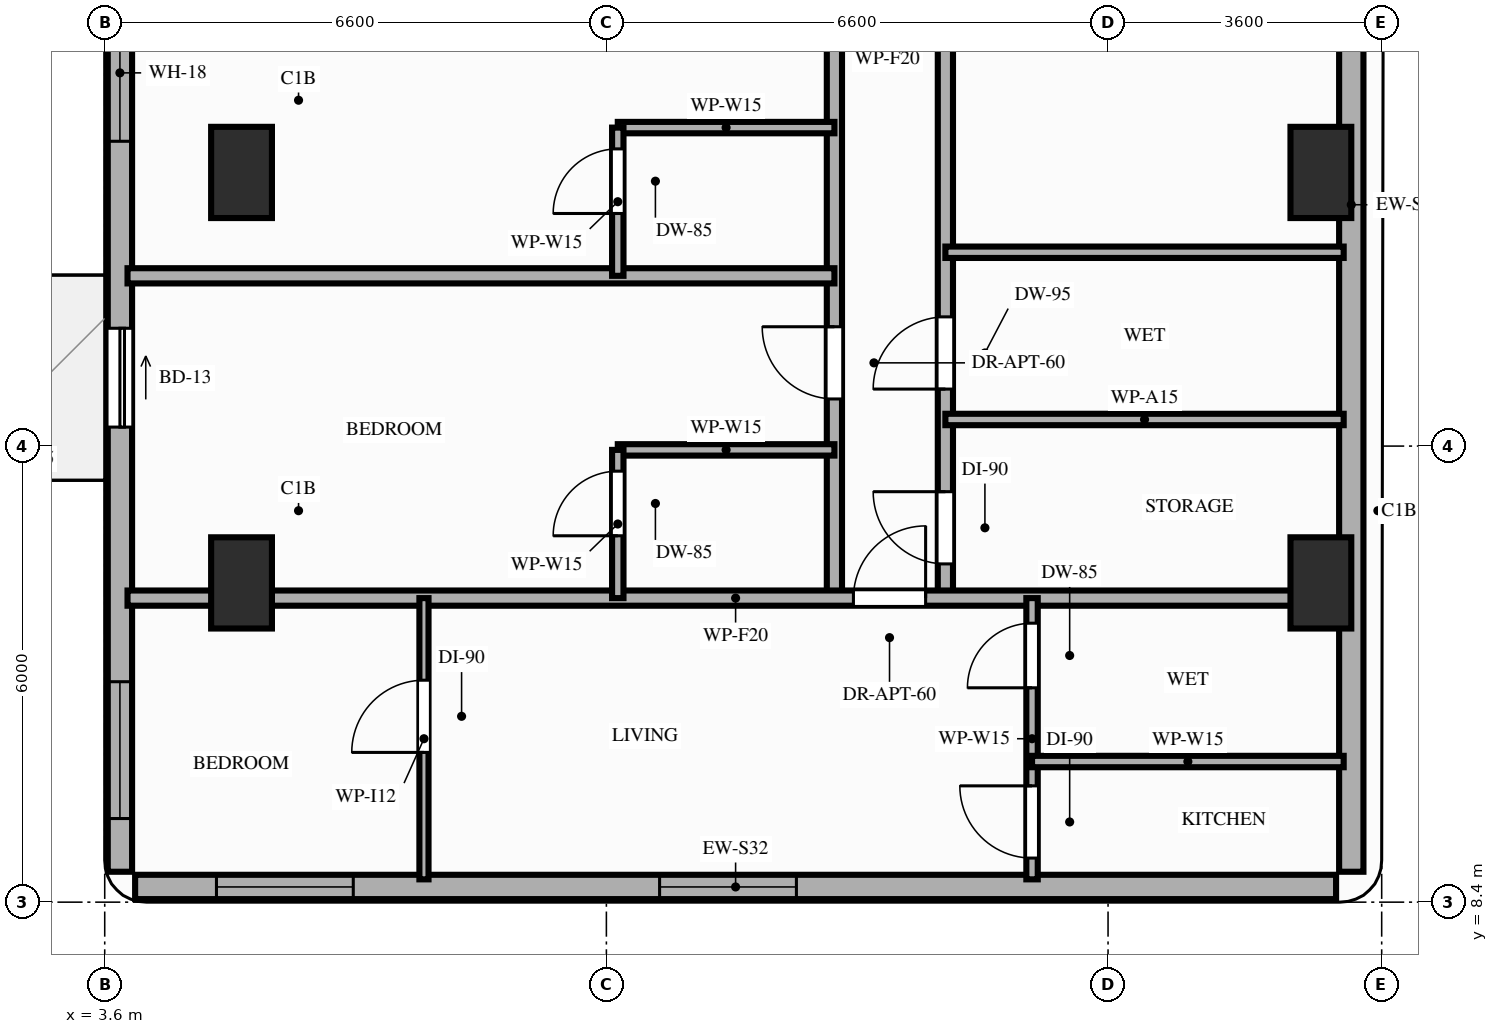
"""IFC4 building model, lengths in metres.
Left out: names, types, materials, properties, quantities, classifications, styles, units other than length and angle.
Written with IfcOpenShell. Run it as: python <this file> out.ifc"""

import sys

from ifc_helpers import new_model, si_unit, direction, frame, frame_2d, origin, origin_2d, place, context, subcontext, project, spatial, rectangle, extrude, element, fill, save


model = new_model("IFC4")
c1 = context("Model", 3, precision=1e-05, world=origin(), true_north=direction((0.0, 1.0)))
c2 = subcontext(c1, "Body", "Model", "MODEL_VIEW")
j1 = project(units=[si_unit("LENGTHUNIT", "METRE"), si_unit("PLANEANGLEUNIT", "RADIAN")], contexts=[c1])
p1 = place(None, origin())
s1 = spatial("IfcSite", under=j1, at=p1, CompositionType="ELEMENT")
p2 = place(p1, origin())
s2 = spatial("IfcBuilding", under=s1, at=p2, CompositionType="ELEMENT")
p3 = place(p2, frame((0.0, 0.0, 96.2)))
s3 = spatial("IfcBuildingStorey", under=s2, at=p3, CompositionType="ELEMENT", Elevation=96.2)
for number, where, z_axis, x_axis in (
    (1, (5.4, 12.6, 0.0), (0.0, 0.0, 1.0), (1.0, 0.0, 0.0)),
    (2, (19.6, 12.6, 0.0), (0.0, 0.0, 1.0), (1.0, 0.0, 0.0)),
    (3, (5.4, 18.0, 0.0), (0.0, 0.0, 1.0), (1.0, 0.0, 0.0)),
    (4, (19.6, 18.0, 0.0), (0.0, 0.0, 1.0), (1.0, 0.0, 0.0)),
):
    element("IfcColumn", number, at=place(p3, frame(where, z_axis=z_axis, x_axis=x_axis)), inside=s3, PredefinedType="COLUMN", context=c2, shape_type="SweptSolid", body=[
        extrude(rectangle(XDim=0.8, YDim=1.2, at=origin_2d()), origin(), (0.0, 0.0, 1.0), 3.2),
    ])
p4 = place(p3, frame((4.0, 8.6, 0.0), z_axis=(0.0, 0.0, 1.0), x_axis=(1.0, 0.0, 0.0)))
e5 = element("IfcWall", 5, at=p4, inside=s3, PredefinedType="STANDARD", context=c2, shape_type="SweptSolid", body=[
    extrude(rectangle(XDim=15.8, YDim=0.32, at=frame_2d((7.9, 0.0))), origin(), (0.0, 0.0, 1.0), 3.02),
])
p5 = place(p4, frame((1.07, 0.0, 0.85)))
e6 = element("IfcOpeningElement", 6, at=p5, cuts=e5, PredefinedType="OPENING", context=c2, shape_type="SweptSolid", body=[
    extrude(rectangle(XDim=1.8, YDim=1.75, at=frame_2d((0.9, 0.875))), frame((0.0, 0.17, 0.0), z_axis=(0.0, -1.0, 0.0), x_axis=(1.0, 0.0, 0.0)), (0.0, 0.0, 1.0), 0.34),
])
p6 = place(p4, frame((6.9, 0.0, 0.85)))
e7 = element("IfcOpeningElement", 7, at=p6, cuts=e5, PredefinedType="OPENING", context=c2, shape_type="SweptSolid", body=[
    extrude(rectangle(XDim=1.8, YDim=1.75, at=frame_2d((0.9, 0.875))), frame((0.0, 0.17, 0.0), z_axis=(0.0, -1.0, 0.0), x_axis=(1.0, 0.0, 0.0)), (0.0, 0.0, 1.0), 0.34),
])
p7 = place(p3, frame((3.8, 42.1, 0.0), z_axis=(0.0, 0.0, 1.0), x_axis=(0.0, -1.0, 0.0)))
e8 = element("IfcWall", 8, at=p7, inside=s3, PredefinedType="STANDARD", context=c2, shape_type="SweptSolid", body=[
    extrude(rectangle(XDim=33.3, YDim=0.32, at=frame_2d((16.65, 0.0))), origin(), (0.0, 0.0, 1.0), 2.71),
])
p8 = place(p7, frame((26.15, 0.0, 0.0)))
e9 = element("IfcOpeningElement", 9, at=p8, cuts=e8, PredefinedType="OPENING", context=c2, shape_type="SweptSolid", body=[
    extrude(rectangle(XDim=1.3, YDim=2.08, at=frame_2d((0.65, 1.04))), frame((0.0, 0.17, 0.0), z_axis=(0.0, -1.0, 0.0), x_axis=(1.0, 0.0, 0.0)), (0.0, 0.0, 1.0), 0.34),
])
p9 = place(p7, frame((15.35, 0.0, 0.0)))
e10 = element("IfcOpeningElement", 10, at=p9, cuts=e8, PredefinedType="OPENING", context=c2, shape_type="SweptSolid", body=[
    extrude(rectangle(XDim=1.3, YDim=2.08, at=frame_2d((0.65, 1.04))), frame((0.0, 0.17, 0.0), z_axis=(0.0, -1.0, 0.0), x_axis=(1.0, 0.0, 0.0)), (0.0, 0.0, 1.0), 0.34),
])
p10 = place(p7, frame((21.89, 0.0, 0.85)))
e11 = element("IfcOpeningElement", 11, at=p10, cuts=e8, PredefinedType="OPENING", context=c2, shape_type="SweptSolid", body=[
    extrude(rectangle(XDim=1.8, YDim=1.61, at=frame_2d((0.9, 0.805))), frame((0.0, 0.17, 0.0), z_axis=(0.0, -1.0, 0.0), x_axis=(1.0, 0.0, 0.0)), (0.0, 0.0, 1.0), 0.34),
])
p11 = place(p7, frame((30.8, 0.0, 0.85)))
e12 = element("IfcOpeningElement", 12, at=p11, cuts=e8, PredefinedType="OPENING", context=c2, shape_type="SweptSolid", body=[
    extrude(rectangle(XDim=1.8, YDim=1.61, at=frame_2d((0.9, 0.805))), frame((0.0, 0.17, 0.0), z_axis=(0.0, -1.0, 0.0), x_axis=(1.0, 0.0, 0.0)), (0.0, 0.0, 1.0), 0.34),
])
p12 = place(p7, frame((9.9, 0.0, 0.85)))
e13 = element("IfcOpeningElement", 13, at=p12, cuts=e8, PredefinedType="OPENING", context=c2, shape_type="SweptSolid", body=[
    extrude(rectangle(XDim=1.8, YDim=1.61, at=frame_2d((0.9, 0.805))), frame((0.0, 0.17, 0.0), z_axis=(0.0, -1.0, 0.0), x_axis=(1.0, 0.0, 0.0)), (0.0, 0.0, 1.0), 0.34),
])
p13 = place(p7, frame((3.8, 0.0, 0.85)))
e14 = element("IfcOpeningElement", 14, at=p13, cuts=e8, PredefinedType="OPENING", context=c2, shape_type="SweptSolid", body=[
    extrude(rectangle(XDim=1.8, YDim=1.61, at=frame_2d((0.9, 0.805))), frame((0.0, 0.17, 0.0), z_axis=(0.0, -1.0, 0.0), x_axis=(1.0, 0.0, 0.0)), (0.0, 0.0, 1.0), 0.34),
])
p14 = place(p3, frame((20.0, 8.8, 0.0), z_axis=(0.0, 0.0, 1.0), x_axis=(0.0, 1.0, 0.0)))
e15 = element("IfcWall", 15, at=p14, inside=s3, PredefinedType="STANDARD", context=c2, shape_type="SweptSolid", body=[
    extrude(rectangle(XDim=17.55, YDim=0.32, at=frame_2d((8.775, 0.0))), origin(), (0.0, 0.0, 1.0), 2.41),
])
p15 = place(p14, frame((11.0, 0.0, 0.85)))
e16 = element("IfcOpeningElement", 16, at=p15, cuts=e15, PredefinedType="OPENING", context=c2, shape_type="SweptSolid", body=[
    extrude(rectangle(XDim=1.8, YDim=1.31, at=frame_2d((0.9, 0.655))), frame((0.0, 0.17, 0.0), z_axis=(0.0, -1.0, 0.0), x_axis=(1.0, 0.0, 0.0)), (0.0, 0.0, 1.0), 0.34),
])
p16 = place(p3, frame((13.2, 12.4, 0.0), z_axis=(0.0, 0.0, 1.0), x_axis=(0.0, 1.0, 0.0)))
e17 = element("IfcWall", 17, at=p16, inside=s3, PredefinedType="PARTITIONING", context=c2, shape_type="SweptSolid", body=[
    extrude(rectangle(XDim=15.7, YDim=0.2, at=frame_2d((7.85, 0.0))), origin(), (0.0, 0.0, 1.0), 2.41),
])
p17 = place(p16, frame((2.62, 0.0, 0.0)))
e18 = element("IfcOpeningElement", 18, at=p17, cuts=e17, PredefinedType="OPENING", context=c2, shape_type="SweptSolid", body=[
    extrude(rectangle(XDim=0.95, YDim=2.15, at=frame_2d((0.475, 1.075))), frame((0.0, 0.11, 0.0), z_axis=(0.0, -1.0, 0.0), x_axis=(1.0, 0.0, 0.0)), (0.0, 0.0, 1.0), 0.22),
])
p18 = place(p16, frame((7.4, 0.0, 0.0)))
e19 = element("IfcOpeningElement", 19, at=p18, cuts=e17, PredefinedType="OPENING", context=c2, shape_type="SweptSolid", body=[
    extrude(rectangle(XDim=0.95, YDim=2.15, at=frame_2d((0.475, 1.075))), frame((0.0, 0.11, 0.0), z_axis=(0.0, -1.0, 0.0), x_axis=(1.0, 0.0, 0.0)), (0.0, 0.0, 1.0), 0.22),
])
p19 = place(p16, frame((12.16, 0.0, 0.0)))
e20 = element("IfcOpeningElement", 20, at=p19, cuts=e17, PredefinedType="OPENING", context=c2, shape_type="SweptSolid", body=[
    extrude(rectangle(XDim=0.95, YDim=2.15, at=frame_2d((0.475, 1.075))), frame((0.0, 0.11, 0.0), z_axis=(0.0, -1.0, 0.0), x_axis=(1.0, 0.0, 0.0)), (0.0, 0.0, 1.0), 0.22),
])
p20 = place(p3, frame((14.66, 12.4, 0.0), z_axis=(0.0, 0.0, 1.0), x_axis=(0.0, 1.0, 0.0)))
e21 = element("IfcWall", 21, at=p20, inside=s3, PredefinedType="PARTITIONING", context=c2, shape_type="SweptSolid", body=[
    extrude(rectangle(XDim=15.7, YDim=0.2, at=frame_2d((7.85, 0.0))), origin(), (0.0, 0.0, 1.0), 2.41),
])
p21 = place(p20, frame((0.45, 0.0, 0.0)))
e22 = element("IfcOpeningElement", 22, at=p21, cuts=e21, PredefinedType="OPENING", context=c2, shape_type="SweptSolid", body=[
    extrude(rectangle(XDim=0.95, YDim=2.15, at=frame_2d((0.475, 1.075))), frame((0.0, 0.11, 0.0), z_axis=(0.0, -1.0, 0.0), x_axis=(1.0, 0.0, 0.0)), (0.0, 0.0, 1.0), 0.22),
])
p22 = place(p20, frame((2.75, 0.0, 0.0)))
e23 = element("IfcOpeningElement", 23, at=p22, cuts=e21, PredefinedType="OPENING", context=c2, shape_type="SweptSolid", body=[
    extrude(rectangle(XDim=0.95, YDim=2.1, at=frame_2d((0.475, 1.05))), frame((0.0, 0.11, 0.0), z_axis=(0.0, -1.0, 0.0), x_axis=(1.0, 0.0, 0.0)), (0.0, 0.0, 1.0), 0.22),
])
p23 = place(p20, frame((9.62, 0.0, 0.0)))
e24 = element("IfcOpeningElement", 24, at=p23, cuts=e21, PredefinedType="OPENING", context=c2, shape_type="SweptSolid", body=[
    extrude(rectangle(XDim=1.0, YDim=2.15, at=frame_2d((0.5, 1.075))), frame((0.0, 0.11, 0.0), z_axis=(0.0, -1.0, 0.0), x_axis=(1.0, 0.0, 0.0)), (0.0, 0.0, 1.0), 0.22),
])
p24 = place(p3, frame((3.9, 12.4, 0.0), z_axis=(0.0, 0.0, 1.0), x_axis=(1.0, 0.0, 0.0)))
e25 = element("IfcWall", 25, at=p24, inside=s3, PredefinedType="PARTITIONING", context=c2, shape_type="SweptSolid", body=[
    extrude(rectangle(XDim=16.0, YDim=0.2, at=frame_2d((8.0, 0.0))), origin(), (0.0, 0.0, 1.0), 2.41),
])
p25 = place(p24, frame((9.55, 0.0, 0.0)))
e26 = element("IfcOpeningElement", 26, at=p25, cuts=e25, PredefinedType="OPENING", context=c2, shape_type="SweptSolid", body=[
    extrude(rectangle(XDim=0.95, YDim=2.15, at=frame_2d((0.475, 1.075))), frame((0.0, 0.11, 0.0), z_axis=(0.0, -1.0, 0.0), x_axis=(1.0, 0.0, 0.0)), (0.0, 0.0, 1.0), 0.22),
])
p26 = place(p3, frame((10.35, 14.35, 0.0), z_axis=(0.0, 0.0, 1.0), x_axis=(1.0, 0.0, 0.0)))
e27 = element("IfcWall", 27, at=p26, inside=s3, PredefinedType="PARTITIONING", context=c2, shape_type="SweptSolid", body=[
    extrude(rectangle(XDim=2.85, YDim=0.15, at=frame_2d((1.425, 0.0))), origin(), (0.0, 0.0, 1.0), 2.71),
])
p27 = place(p3, frame((10.35, 12.4, 0.0), z_axis=(0.0, 0.0, 1.0), x_axis=(0.0, 1.0, 0.0)))
e28 = element("IfcWall", 28, at=p27, inside=s3, PredefinedType="PARTITIONING", context=c2, shape_type="SweptSolid", body=[
    extrude(rectangle(XDim=1.95, YDim=0.15, at=frame_2d((0.975, 0.0))), origin(), (0.0, 0.0, 1.0), 2.41),
])
p28 = place(p27, frame((0.82, 0.0, 0.0)))
e29 = element("IfcOpeningElement", 29, at=p28, cuts=e28, PredefinedType="OPENING", context=c2, shape_type="SweptSolid", body=[
    extrude(rectangle(XDim=0.85, YDim=2.1, at=frame_2d((0.425, 1.05))), frame((0.0, 0.085, 0.0), z_axis=(0.0, -1.0, 0.0), x_axis=(1.0, 0.0, 0.0)), (0.0, 0.0, 1.0), 0.17),
])
p29 = place(p3, frame((3.9, 16.64, 0.0), z_axis=(0.0, 0.0, 1.0), x_axis=(1.0, 0.0, 0.0)))
e30 = element("IfcWall", 30, at=p29, inside=s3, PredefinedType="PARTITIONING", context=c2, shape_type="SweptSolid", body=[
    extrude(rectangle(XDim=9.3, YDim=0.2, at=frame_2d((4.65, 0.0))), origin(), (0.0, 0.0, 1.0), 2.41),
])
p30 = place(p3, frame((10.35, 18.59, 0.0), z_axis=(0.0, 0.0, 1.0), x_axis=(1.0, 0.0, 0.0)))
e31 = element("IfcWall", 31, at=p30, inside=s3, PredefinedType="PARTITIONING", context=c2, shape_type="SweptSolid", body=[
    extrude(rectangle(XDim=2.85, YDim=0.15, at=frame_2d((1.425, 0.0))), origin(), (0.0, 0.0, 1.0), 3.02),
])
p31 = place(p3, frame((10.35, 16.64, 0.0), z_axis=(0.0, 0.0, 1.0), x_axis=(0.0, 1.0, 0.0)))
e32 = element("IfcWall", 32, at=p31, inside=s3, PredefinedType="PARTITIONING", context=c2, shape_type="SweptSolid", body=[
    extrude(rectangle(XDim=1.95, YDim=0.15, at=frame_2d((0.975, 0.0))), origin(), (0.0, 0.0, 1.0), 2.41),
])
p32 = place(p31, frame((0.82, 0.0, 0.0)))
e33 = element("IfcOpeningElement", 33, at=p32, cuts=e32, PredefinedType="OPENING", context=c2, shape_type="SweptSolid", body=[
    extrude(rectangle(XDim=0.85, YDim=2.1, at=frame_2d((0.425, 1.05))), frame((0.0, 0.085, 0.0), z_axis=(0.0, -1.0, 0.0), x_axis=(1.0, 0.0, 0.0)), (0.0, 0.0, 1.0), 0.17),
])
p33 = place(p3, frame((7.8, 8.7, 0.0), z_axis=(0.0, 0.0, 1.0), x_axis=(0.0, 1.0, 0.0)))
e34 = element("IfcWall", 34, at=p33, inside=s3, PredefinedType="PARTITIONING", context=c2, shape_type="SweptSolid", body=[
    extrude(rectangle(XDim=3.7, YDim=0.12, at=frame_2d((1.85, 0.0))), origin(), (0.0, 0.0, 1.0), 2.41),
])
p34 = place(p33, frame((1.67, 0.0, 0.0)))
e35 = element("IfcOpeningElement", 35, at=p34, cuts=e34, PredefinedType="OPENING", context=c2, shape_type="SweptSolid", body=[
    extrude(rectangle(XDim=0.95, YDim=2.15, at=frame_2d((0.475, 1.075))), frame((0.0, 0.07, 0.0), z_axis=(0.0, -1.0, 0.0), x_axis=(1.0, 0.0, 0.0)), (0.0, 0.0, 1.0), 0.14),
])
p35 = place(p3, frame((15.8, 8.7, 0.0), z_axis=(0.0, 0.0, 1.0), x_axis=(0.0, 1.0, 0.0)))
e36 = element("IfcWall", 36, at=p35, inside=s3, PredefinedType="PARTITIONING", context=c2, shape_type="SweptSolid", body=[
    extrude(rectangle(XDim=3.7, YDim=0.15, at=frame_2d((1.85, 0.0))), origin(), (0.0, 0.0, 1.0), 2.41),
])
p36 = place(p35, frame((0.28, 0.0, 0.0)))
e37 = element("IfcOpeningElement", 37, at=p36, cuts=e36, PredefinedType="OPENING", context=c2, shape_type="SweptSolid", body=[
    extrude(rectangle(XDim=0.95, YDim=2.15, at=frame_2d((0.475, 1.075))), frame((0.0, 0.085, 0.0), z_axis=(0.0, -1.0, 0.0), x_axis=(1.0, 0.0, 0.0)), (0.0, 0.0, 1.0), 0.17),
])
p37 = place(p35, frame((2.52, 0.0, 0.0)))
e38 = element("IfcOpeningElement", 38, at=p37, cuts=e36, PredefinedType="OPENING", context=c2, shape_type="SweptSolid", body=[
    extrude(rectangle(XDim=0.85, YDim=2.1, at=frame_2d((0.425, 1.05))), frame((0.0, 0.085, 0.0), z_axis=(0.0, -1.0, 0.0), x_axis=(1.0, 0.0, 0.0)), (0.0, 0.0, 1.0), 0.17),
])
p38 = place(p3, frame((15.8, 10.25, 0.0), z_axis=(0.0, 0.0, 1.0), x_axis=(1.0, 0.0, 0.0)))
e39 = element("IfcWall", 39, at=p38, inside=s3, PredefinedType="PARTITIONING", context=c2, shape_type="SweptSolid", body=[
    extrude(rectangle(XDim=4.1, YDim=0.15, at=frame_2d((2.05, 0.0))), origin(), (0.0, 0.0, 1.0), 3.02),
])
for number, where, z_axis, x_axis in (
    (40, (14.66, 14.75, 0.0), (0.0, 0.0, 1.0), (1.0, 0.0, 0.0)),
    (41, (14.66, 16.95, 0.0), (0.0, 0.0, 1.0), (1.0, 0.0, 0.0)),
):
    element("IfcWall", number, at=place(p3, frame(where, z_axis=z_axis, x_axis=x_axis)), inside=s3, PredefinedType="PARTITIONING", context=c2, shape_type="SweptSolid", body=[
        extrude(rectangle(XDim=5.24, YDim=0.15, at=frame_2d((2.62, 0.0))), origin(), (0.0, 0.0, 1.0), 2.41),
    ])
p39 = place(p8, origin())
e42 = element("IfcDoor", 42, at=p39, inside=s3, OperationType="SLIDING_TO_LEFT", PredefinedType="DOOR", context=c2, shape_type="SweptSolid", body=[
    extrude(rectangle(XDim=1.3, YDim=2.08, at=frame_2d((0.65, 1.04))), frame((0.0, 0.025, 0.0), z_axis=(0.0, -1.0, 0.0), x_axis=(1.0, 0.0, 0.0)), (0.0, 0.0, 1.0), 0.05),
])
fill(e9, e42)
p40 = place(p10, origin())
e43 = element("IfcWindow", 43, at=p40, inside=s3, PartitioningType="SINGLE_PANEL", PredefinedType="WINDOW", context=c2, shape_type="SweptSolid", body=[
    extrude(rectangle(XDim=1.8, YDim=1.61, at=frame_2d((0.9, 0.805))), frame((0.0, 0.03, 0.0), z_axis=(0.0, -1.0, 0.0), x_axis=(1.0, 0.0, 0.0)), (0.0, 0.0, 1.0), 0.06),
])
fill(e11, e43)
p41 = place(p5, origin())
e44 = element("IfcWindow", 44, at=p41, inside=s3, PartitioningType="SINGLE_PANEL", PredefinedType="WINDOW", context=c2, shape_type="SweptSolid", body=[
    extrude(rectangle(XDim=1.8, YDim=1.75, at=frame_2d((0.9, 0.875))), frame((0.0, 0.03, 0.0), z_axis=(0.0, -1.0, 0.0), x_axis=(1.0, 0.0, 0.0)), (0.0, 0.0, 1.0), 0.06),
])
fill(e6, e44)
p42 = place(p6, origin())
e45 = element("IfcWindow", 45, at=p42, inside=s3, PartitioningType="SINGLE_PANEL", PredefinedType="WINDOW", context=c2, shape_type="SweptSolid", body=[
    extrude(rectangle(XDim=1.8, YDim=1.75, at=frame_2d((0.9, 0.875))), frame((0.0, 0.03, 0.0), z_axis=(0.0, -1.0, 0.0), x_axis=(1.0, 0.0, 0.0)), (0.0, 0.0, 1.0), 0.06),
])
fill(e7, e45)
p43 = place(p11, origin())
e46 = element("IfcWindow", 46, at=p43, inside=s3, PartitioningType="SINGLE_PANEL", PredefinedType="WINDOW", context=c2, shape_type="SweptSolid", body=[
    extrude(rectangle(XDim=1.8, YDim=1.61, at=frame_2d((0.9, 0.805))), frame((0.0, 0.03, 0.0), z_axis=(0.0, -1.0, 0.0), x_axis=(1.0, 0.0, 0.0)), (0.0, 0.0, 1.0), 0.06),
])
fill(e12, e46)
p44 = place(p28, origin())
e47 = element("IfcDoor", 47, at=p44, inside=s3, OperationType="SINGLE_SWING_LEFT", PredefinedType="DOOR", context=c2, shape_type="SweptSolid", body=[
    extrude(rectangle(XDim=0.85, YDim=2.1, at=frame_2d((0.425, 1.05))), frame((0.0, 0.025, 0.0), z_axis=(0.0, -1.0, 0.0), x_axis=(1.0, 0.0, 0.0)), (0.0, 0.0, 1.0), 0.05),
])
fill(e29, e47)
p45 = place(p17, origin())
e48 = element("IfcDoor", 48, at=p45, inside=s3, OperationType="SINGLE_SWING_RIGHT", PredefinedType="DOOR", context=c2, shape_type="SweptSolid", body=[
    extrude(rectangle(XDim=0.95, YDim=2.15, at=frame_2d((0.475, 1.075))), frame((0.0, 0.025, 0.0), z_axis=(0.0, -1.0, 0.0), x_axis=(1.0, 0.0, 0.0)), (0.0, 0.0, 1.0), 0.05),
])
fill(e18, e48)
p46 = place(p32, origin())
e49 = element("IfcDoor", 49, at=p46, inside=s3, OperationType="SINGLE_SWING_LEFT", PredefinedType="DOOR", context=c2, shape_type="SweptSolid", body=[
    extrude(rectangle(XDim=0.85, YDim=2.1, at=frame_2d((0.425, 1.05))), frame((0.0, 0.025, 0.0), z_axis=(0.0, -1.0, 0.0), x_axis=(1.0, 0.0, 0.0)), (0.0, 0.0, 1.0), 0.05),
])
fill(e33, e49)
p47 = place(p25, origin())
e50 = element("IfcDoor", 50, at=p47, inside=s3, OperationType="SINGLE_SWING_RIGHT", PredefinedType="DOOR", context=c2, shape_type="SweptSolid", body=[
    extrude(rectangle(XDim=0.95, YDim=2.15, at=frame_2d((0.475, 1.075))), frame((0.0, 0.025, 0.0), z_axis=(0.0, -1.0, 0.0), x_axis=(1.0, 0.0, 0.0)), (0.0, 0.0, 1.0), 0.05),
])
fill(e26, e50)
p48 = place(p34, origin())
e51 = element("IfcDoor", 51, at=p48, inside=s3, OperationType="SINGLE_SWING_LEFT", PredefinedType="DOOR", context=c2, shape_type="SweptSolid", body=[
    extrude(rectangle(XDim=0.95, YDim=2.15, at=frame_2d((0.475, 1.075))), frame((0.0, 0.025, 0.0), z_axis=(0.0, -1.0, 0.0), x_axis=(1.0, 0.0, 0.0)), (0.0, 0.0, 1.0), 0.05),
])
fill(e35, e51)
p49 = place(p36, origin())
e52 = element("IfcDoor", 52, at=p49, inside=s3, OperationType="SINGLE_SWING_RIGHT", PredefinedType="DOOR", context=c2, shape_type="SweptSolid", body=[
    extrude(rectangle(XDim=0.95, YDim=2.15, at=frame_2d((0.475, 1.075))), frame((0.0, 0.025, 0.0), z_axis=(0.0, -1.0, 0.0), x_axis=(1.0, 0.0, 0.0)), (0.0, 0.0, 1.0), 0.05),
])
fill(e37, e52)
p50 = place(p37, origin())
e53 = element("IfcDoor", 53, at=p50, inside=s3, OperationType="SINGLE_SWING_LEFT", PredefinedType="DOOR", context=c2, shape_type="SweptSolid", body=[
    extrude(rectangle(XDim=0.85, YDim=2.1, at=frame_2d((0.425, 1.05))), frame((0.0, 0.025, 0.0), z_axis=(0.0, -1.0, 0.0), x_axis=(1.0, 0.0, 0.0)), (0.0, 0.0, 1.0), 0.05),
])
fill(e38, e53)
p51 = place(p21, origin())
e54 = element("IfcDoor", 54, at=p51, inside=s3, OperationType="SINGLE_SWING_RIGHT", PredefinedType="DOOR", context=c2, shape_type="SweptSolid", body=[
    extrude(rectangle(XDim=0.95, YDim=2.15, at=frame_2d((0.475, 1.075))), frame((0.0, 0.025, 0.0), z_axis=(0.0, -1.0, 0.0), x_axis=(1.0, 0.0, 0.0)), (0.0, 0.0, 1.0), 0.05),
])
fill(e22, e54)
p52 = place(p22, origin())
e55 = element("IfcDoor", 55, at=p52, inside=s3, OperationType="SINGLE_SWING_LEFT", PredefinedType="DOOR", context=c2, shape_type="SweptSolid", body=[
    extrude(rectangle(XDim=0.95, YDim=2.1, at=frame_2d((0.475, 1.05))), frame((0.0, 0.025, 0.0), z_axis=(0.0, -1.0, 0.0), x_axis=(1.0, 0.0, 0.0)), (0.0, 0.0, 1.0), 0.05),
])
fill(e23, e55)
save(model, sys.argv[1])
